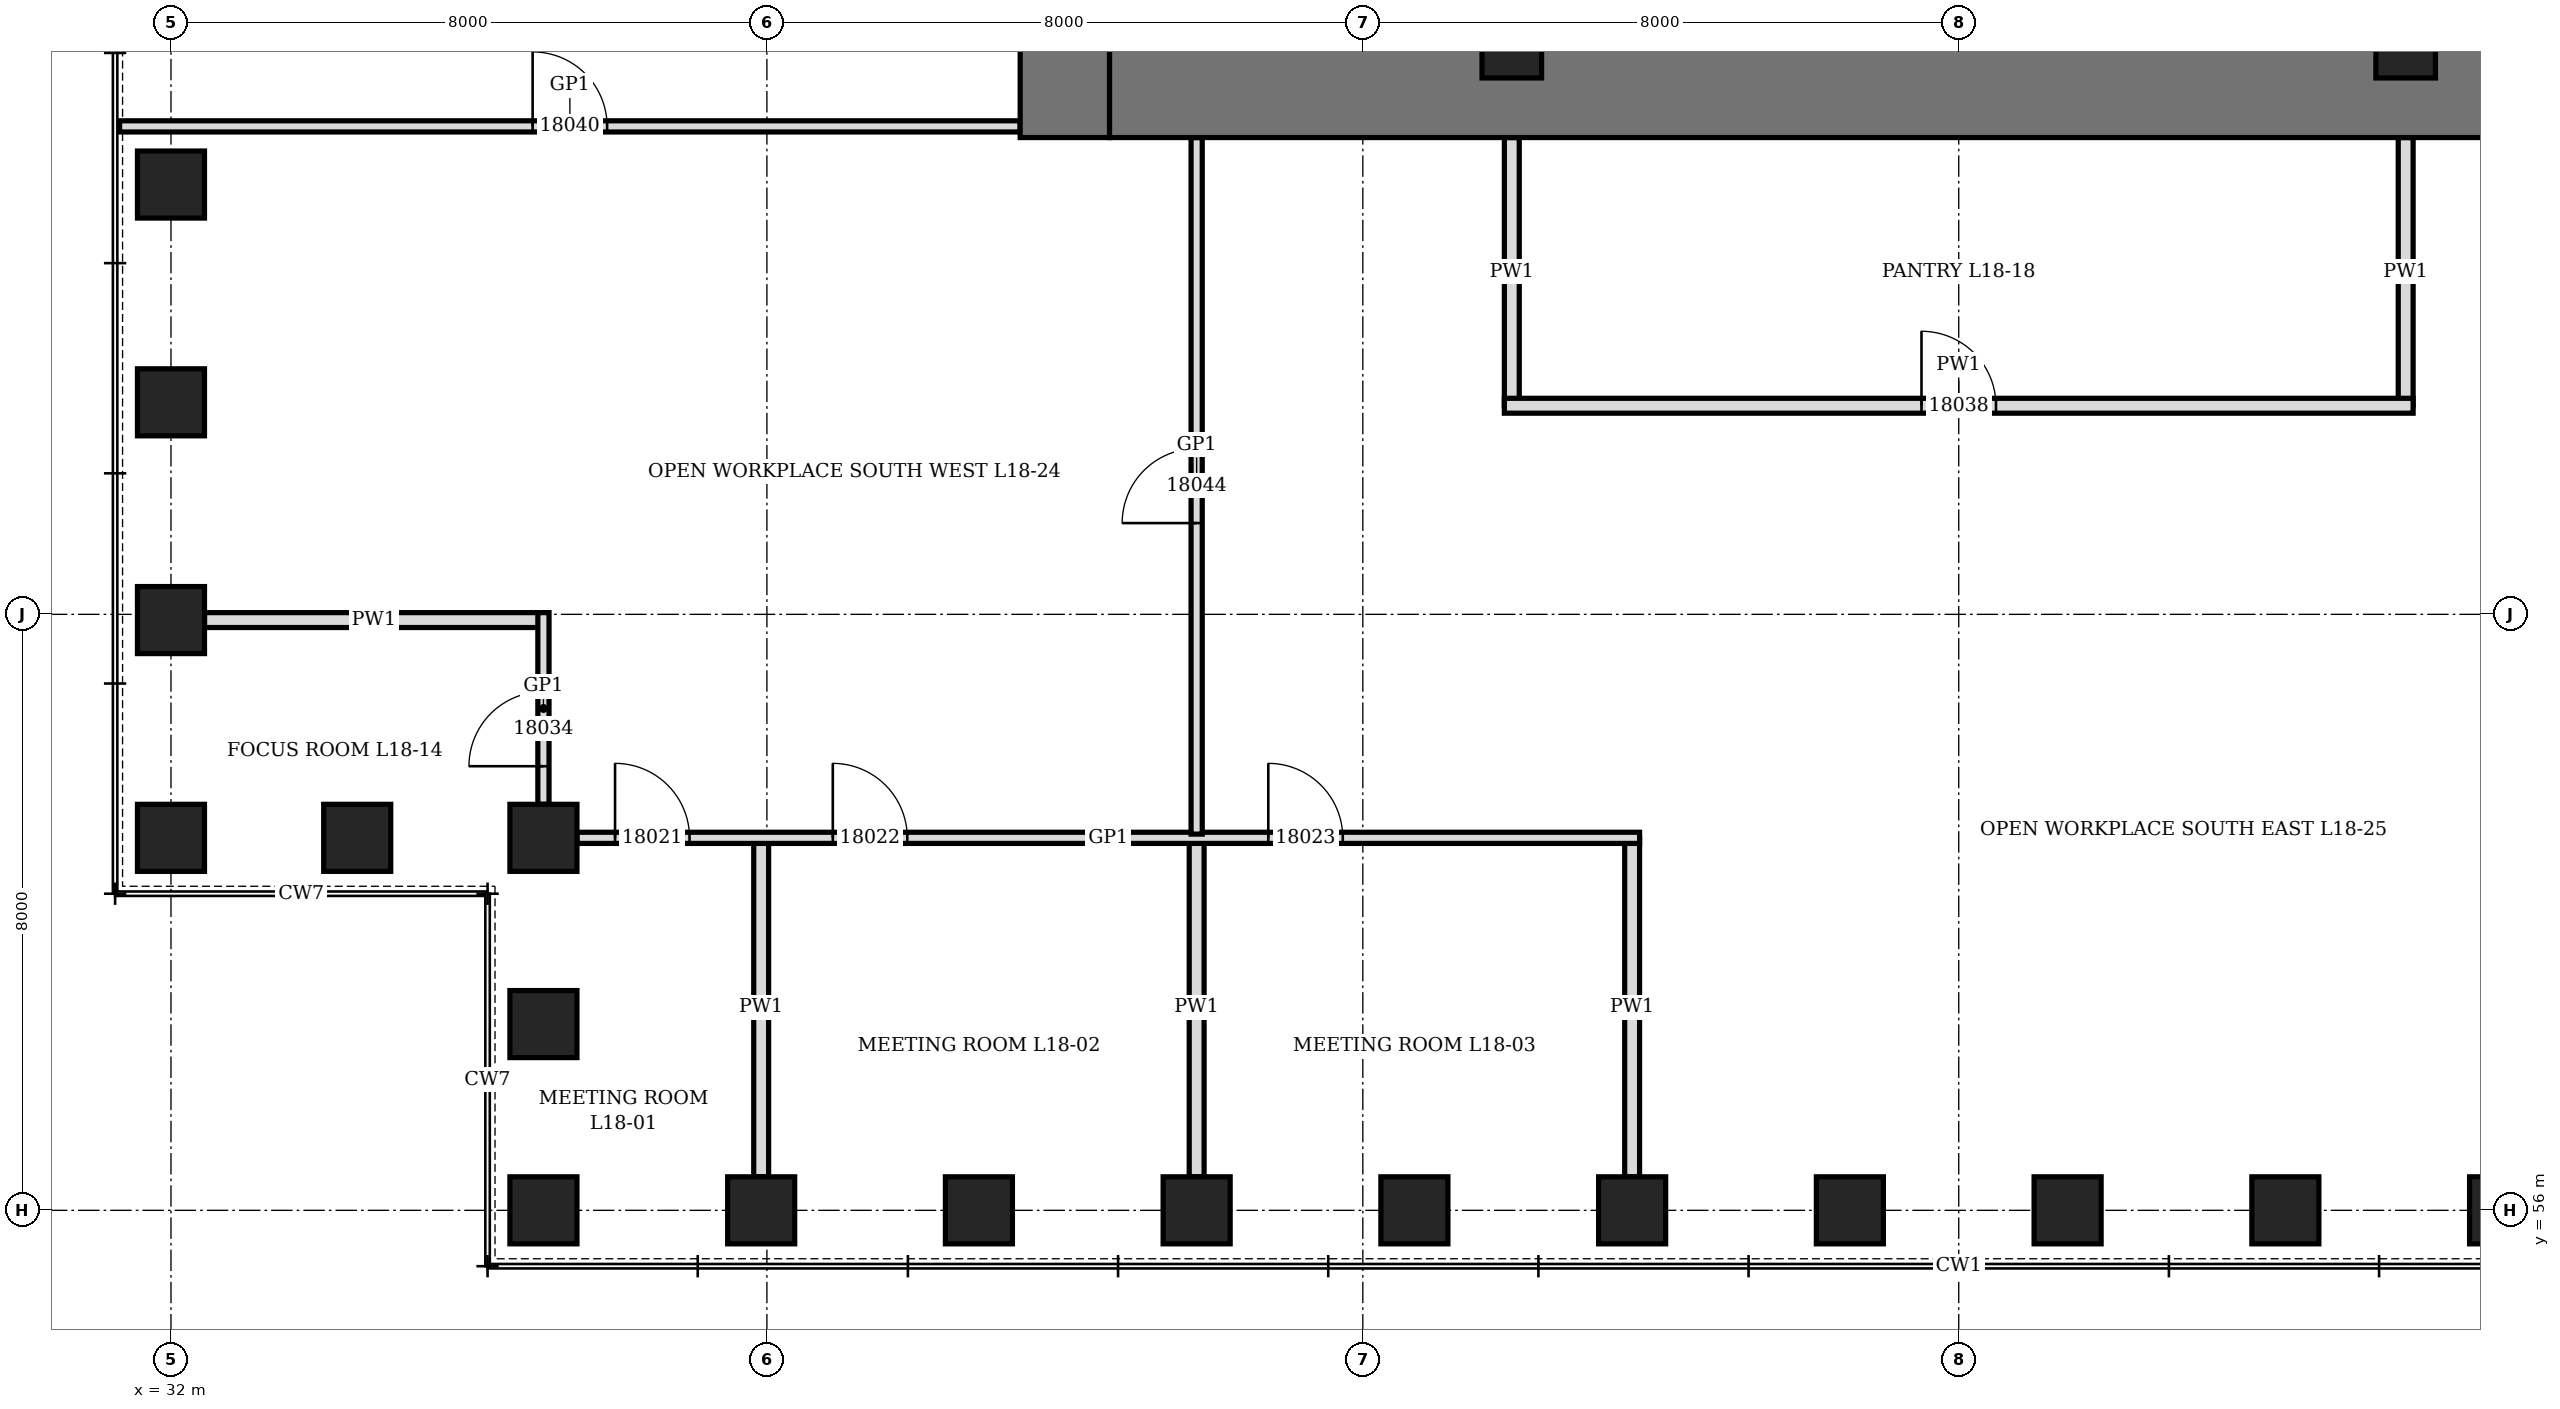
"""IFC4 building model, lengths in metres.
Left out: names, types, materials, properties, quantities, classifications, styles, units other than length and angle.
Written with IfcOpenShell. Run it as: python <this file> out.ifc"""

import sys

from ifc_helpers import new_model, si_unit, direction, frame, frame_2d, origin, origin_2d, place, context, subcontext, project, spatial, rectangle, hollow_rectangle, extrude, element, fill, save


model = new_model("IFC4")
c1 = context("Model", 3, precision=1e-05, world=origin(), true_north=direction((0.0, 1.0)))
c2 = subcontext(c1, "Body", "Model", "MODEL_VIEW")
j1 = project(units=[si_unit("LENGTHUNIT", "METRE"), si_unit("PLANEANGLEUNIT", "RADIAN")], contexts=[c1])
p1 = place(None, origin())
s1 = spatial("IfcSite", under=j1, at=p1, CompositionType="ELEMENT")
p2 = place(p1, origin())
s2 = spatial("IfcBuilding", under=s1, at=p2, CompositionType="ELEMENT")
p3 = place(p2, frame((0.0, 0.0, 85.3)))
s3 = spatial("IfcBuildingStorey", under=s2, at=p3, CompositionType="ELEMENT", Elevation=85.3)
for number, where, z_axis, x_axis in (
    (1, (37.0, 56.0, 0.0), (0.0, 0.0, 1.0), (1.0, 0.0, 0.0)),
    (2, (39.923, 56.0, 0.0), (0.0, 0.0, 1.0), (1.0, 0.0, 0.0)),
    (3, (42.846, 56.0, 0.0), (0.0, 0.0, 1.0), (1.0, 0.0, 0.0)),
    (4, (45.769, 56.0, 0.0), (0.0, 0.0, 1.0), (1.0, 0.0, 0.0)),
    (5, (48.692, 56.0, 0.0), (0.0, 0.0, 1.0), (1.0, 0.0, 0.0)),
    (6, (51.615, 56.0, 0.0), (0.0, 0.0, 1.0), (1.0, 0.0, 0.0)),
    (7, (54.539, 56.0, 0.0), (0.0, 0.0, 1.0), (1.0, 0.0, 0.0)),
    (8, (57.461, 56.0, 0.0), (0.0, 0.0, 1.0), (1.0, 0.0, 0.0)),
    (9, (60.385, 56.0, 0.0), (0.0, 0.0, 1.0), (1.0, 0.0, 0.0)),
    (10, (63.308, 56.0, 0.0), (0.0, 0.0, 1.0), (1.0, 0.0, 0.0)),
    (11, (32.0, 69.769, 0.0), (0.0, 0.0, 1.0), (0.0, 1.0, 0.0)),
    (12, (32.0, 66.846, 0.0), (0.0, 0.0, 1.0), (0.0, 1.0, 0.0)),
    (13, (32.0, 63.923, 0.0), (0.0, 0.0, 1.0), (0.0, 1.0, 0.0)),
    (14, (32.0, 61.0, 0.0), (0.0, 0.0, 1.0), (1.0, 0.0, 0.0)),
    (15, (34.5, 61.0, 0.0), (0.0, 0.0, 1.0), (1.0, 0.0, 0.0)),
    (16, (37.0, 61.0, 0.0), (0.0, 0.0, 1.0), (0.0, 1.0, 0.0)),
    (17, (37.0, 58.5, 0.0), (0.0, 0.0, 1.0), (0.0, 1.0, 0.0)),
):
    element("IfcColumn", number, at=place(p3, frame(where, z_axis=z_axis, x_axis=x_axis)), inside=s3, PredefinedType="COLUMN", context=c2, shape_type="SweptSolid", body=[
        extrude(hollow_rectangle(XDim=0.9, YDim=0.9, WallThickness=0.12, at=origin_2d()), origin(), (0.0, 0.0, 1.0), 4.2),
    ])
p4 = place(p3, frame((44.0, 70.4, 0.0), z_axis=(0.0, 0.0, 1.0), x_axis=(0.0, 1.0, 0.0)))
e18 = element("IfcWall", 18, at=p4, inside=s3, PredefinedType="SHEAR", context=c2, shape_type="SweptSolid", body=[
    extrude(rectangle(XDim=19.2, YDim=1.2, at=frame_2d((9.6, 0.0))), origin(), (0.0, 0.0, 1.0), 4.2),
])
p5 = place(p4, frame((8.6, 0.0, 0.0)))
e19 = element("IfcOpeningElement", 19, at=p5, cuts=e18, PredefinedType="OPENING", context=c2, shape_type="SweptSolid", body=[
    extrude(rectangle(XDim=2.0, YDim=2.4, at=frame_2d((1.0, 1.2))), frame((0.0, 0.61, 0.0), z_axis=(0.0, -1.0, 0.0), x_axis=(1.0, 0.0, 0.0)), (0.0, 0.0, 1.0), 1.22),
])
p6 = place(p3, frame((44.6, 71.0, 0.0), z_axis=(0.0, 0.0, 1.0), x_axis=(1.0, 0.0, 0.0)))
e20 = element("IfcWall", 20, at=p6, inside=s3, PredefinedType="SHEAR", context=c2, shape_type="SweptSolid", body=[
    extrude(rectangle(XDim=22.8, YDim=1.2, at=frame_2d((11.4, 0.0))), origin(), (0.0, 0.0, 1.0), 4.2),
])
for number, where, z_axis, x_axis in (
    (21, (50.0, 71.6, 0.0), (0.0, 0.0, 1.0), (1.0, 0.0, 0.0)),
    (22, (62.0, 71.6, 0.0), (0.0, 0.0, 1.0), (1.0, 0.0, 0.0)),
):
    element("IfcColumn", number, at=place(p3, frame(where, z_axis=z_axis, x_axis=x_axis)), inside=s3, PredefinedType="COLUMN", context=c2, shape_type="SweptSolid", body=[
        extrude(hollow_rectangle(XDim=0.8, YDim=0.8, WallThickness=0.1, at=origin_2d()), origin(), (0.0, 0.0, 1.0), 4.2),
    ])
p7 = place(p3, frame((39.923, 56.45, 0.0), z_axis=(0.0, 0.0, 1.0), x_axis=(0.0, 1.0, 0.0)))
e23 = element("IfcWall", 23, at=p7, inside=s3, PredefinedType="PARTITIONING", context=c2, shape_type="SweptSolid", body=[
    extrude(rectangle(XDim=4.55, YDim=0.2, at=frame_2d((2.275, 0.0))), origin(), (0.0, 0.0, 1.0), 3.428),
])
for number, where, z_axis, x_axis in (
    (24, (45.769, 56.45, 0.0), (0.0, 0.0, 1.0), (0.0, 1.0, 0.0)),
    (25, (51.615, 56.45, 0.0), (0.0, 0.0, 1.0), (0.0, 1.0, 0.0)),
):
    element("IfcWall", number, at=place(p3, frame(where, z_axis=z_axis, x_axis=x_axis)), inside=s3, PredefinedType="PARTITIONING", context=c2, shape_type="SweptSolid", body=[
        extrude(rectangle(XDim=4.55, YDim=0.2, at=frame_2d((2.275, 0.0))), origin(), (0.0, 0.0, 1.0), 3.278),
    ])
p8 = place(p3, frame((32.45, 63.923, 0.0), z_axis=(0.0, 0.0, 1.0), x_axis=(1.0, 0.0, 0.0)))
e26 = element("IfcWall", 26, at=p8, inside=s3, PredefinedType="PARTITIONING", context=c2, shape_type="SweptSolid", body=[
    extrude(rectangle(XDim=4.55, YDim=0.2, at=frame_2d((2.275, 0.0))), origin(), (0.0, 0.0, 1.0), 3.428),
])
for number, where, z_axis, x_axis in (
    (27, (50.0, 66.8, 0.0), (0.0, 0.0, 1.0), (0.0, 1.0, 0.0)),
    (28, (62.0, 66.8, 0.0), (0.0, 0.0, 1.0), (0.0, 1.0, 0.0)),
):
    element("IfcWall", number, at=place(p3, frame(where, z_axis=z_axis, x_axis=x_axis)), inside=s3, PredefinedType="PARTITIONING", context=c2, shape_type="SweptSolid", body=[
        extrude(rectangle(XDim=3.6, YDim=0.2, at=frame_2d((1.8, 0.0))), origin(), (0.0, 0.0, 1.0), 4.04),
    ])
p9 = place(p3, frame((37.45, 61.0, 0.0), z_axis=(0.0, 0.0, 1.0), x_axis=(1.0, 0.0, 0.0)))
e29 = element("IfcWall", 29, at=p9, inside=s3, PredefinedType="PARTITIONING", context=c2, shape_type="SweptSolid", body=[
    extrude(rectangle(XDim=14.265, YDim=0.15, at=frame_2d((7.133, 0.0))), origin(), (0.0, 0.0, 1.0), 4.04),
])
p10 = place(p9, frame((0.511, 0.0, 0.0)))
e30 = element("IfcOpeningElement", 30, at=p10, cuts=e29, PredefinedType="OPENING", context=c2, shape_type="SweptSolid", body=[
    extrude(rectangle(XDim=1.0, YDim=2.4, at=frame_2d((0.5, 1.2))), frame((0.0, 0.085, 0.0), z_axis=(0.0, -1.0, 0.0), x_axis=(1.0, 0.0, 0.0)), (0.0, 0.0, 1.0), 0.17),
])
p11 = place(p9, frame((3.435, 0.0, 0.0)))
e31 = element("IfcOpeningElement", 31, at=p11, cuts=e29, PredefinedType="OPENING", context=c2, shape_type="SweptSolid", body=[
    extrude(rectangle(XDim=1.0, YDim=2.4, at=frame_2d((0.5, 1.2))), frame((0.0, 0.085, 0.0), z_axis=(0.0, -1.0, 0.0), x_axis=(1.0, 0.0, 0.0)), (0.0, 0.0, 1.0), 0.17),
])
p12 = place(p9, frame((9.281, 0.0, 0.0)))
e32 = element("IfcOpeningElement", 32, at=p12, cuts=e29, PredefinedType="OPENING", context=c2, shape_type="SweptSolid", body=[
    extrude(rectangle(XDim=1.0, YDim=2.4, at=frame_2d((0.5, 1.2))), frame((0.0, 0.085, 0.0), z_axis=(0.0, -1.0, 0.0), x_axis=(1.0, 0.0, 0.0)), (0.0, 0.0, 1.0), 0.17),
])
p13 = place(p3, frame((49.9, 66.8, 0.0), z_axis=(0.0, 0.0, 1.0), x_axis=(1.0, 0.0, 0.0)))
e33 = element("IfcWall", 33, at=p13, inside=s3, PredefinedType="PARTITIONING", context=c2, shape_type="SweptSolid", body=[
    extrude(rectangle(XDim=12.2, YDim=0.2, at=frame_2d((6.1, 0.0))), origin(), (0.0, 0.0, 1.0), 4.04),
])
p14 = place(p13, frame((5.6, 0.0, 0.0)))
e34 = element("IfcOpeningElement", 34, at=p14, cuts=e33, PredefinedType="OPENING", context=c2, shape_type="SweptSolid", body=[
    extrude(rectangle(XDim=1.0, YDim=2.1, at=frame_2d((0.5, 1.05))), frame((0.0, 0.11, 0.0), z_axis=(0.0, -1.0, 0.0), x_axis=(1.0, 0.0, 0.0)), (0.0, 0.0, 1.0), 0.22),
])
p15 = place(p3, frame((31.31, 70.55, 0.0), z_axis=(0.0, 0.0, 1.0), x_axis=(1.0, 0.0, 0.0)))
e35 = element("IfcWall", 35, at=p15, inside=s3, PredefinedType="PARTITIONING", context=c2, shape_type="SweptSolid", body=[
    extrude(rectangle(XDim=12.09, YDim=0.15, at=frame_2d((6.045, 0.0))), origin(), (0.0, 0.0, 1.0), 4.04),
])
p16 = place(p15, frame((5.545, 0.0, 0.0)))
e36 = element("IfcOpeningElement", 36, at=p16, cuts=e35, PredefinedType="OPENING", context=c2, shape_type="SweptSolid", body=[
    extrude(rectangle(XDim=1.0, YDim=2.4, at=frame_2d((0.5, 1.2))), frame((0.0, 0.085, 0.0), z_axis=(0.0, -1.0, 0.0), x_axis=(1.0, 0.0, 0.0)), (0.0, 0.0, 1.0), 0.17),
])
p17 = place(p3, frame((37.0, 61.45, 0.0), z_axis=(0.0, 0.0, 1.0), x_axis=(0.0, 1.0, 0.0)))
e37 = element("IfcWall", 37, at=p17, inside=s3, PredefinedType="PARTITIONING", context=c2, shape_type="SweptSolid", body=[
    extrude(rectangle(XDim=2.573, YDim=0.15, at=frame_2d((1.287, 0.0))), origin(), (0.0, 0.0, 1.0), 4.04),
])
p18 = place(p17, frame((0.511, 0.0, 0.0)))
e38 = element("IfcOpeningElement", 38, at=p18, cuts=e37, PredefinedType="OPENING", context=c2, shape_type="SweptSolid", body=[
    extrude(rectangle(XDim=1.0, YDim=2.4, at=frame_2d((0.5, 1.2))), frame((0.0, 0.085, 0.0), z_axis=(0.0, -1.0, 0.0), x_axis=(1.0, 0.0, 0.0)), (0.0, 0.0, 1.0), 0.17),
])
p19 = place(p3, frame((45.769, 61.05, 0.0), z_axis=(0.0, 0.0, 1.0), x_axis=(0.0, 1.0, 0.0)))
e39 = element("IfcWall", 39, at=p19, inside=s3, PredefinedType="PARTITIONING", context=c2, shape_type="SweptSolid", body=[
    extrude(rectangle(XDim=9.35, YDim=0.15, at=frame_2d((4.675, 0.0))), origin(), (0.0, 0.0, 1.0), 3.278),
])
p20 = place(p19, frame((4.175, 0.0, 0.0)))
e40 = element("IfcOpeningElement", 40, at=p20, cuts=e39, PredefinedType="OPENING", context=c2, shape_type="SweptSolid", body=[
    extrude(rectangle(XDim=1.0, YDim=2.4, at=frame_2d((0.5, 1.2))), frame((0.0, 0.085, 0.0), z_axis=(0.0, -1.0, 0.0), x_axis=(1.0, 0.0, 0.0)), (0.0, 0.0, 1.0), 0.17),
])
p21 = place(p10, origin())
e41 = element("IfcDoor", 41, at=p21, inside=s3, OperationType="SINGLE_SWING_RIGHT", PredefinedType="DOOR", context=c2, shape_type="SweptSolid", body=[
    extrude(rectangle(XDim=1.0, YDim=2.4, at=frame_2d((0.5, 1.2))), frame((0.0, 0.075, 0.0), z_axis=(0.0, -1.0, 0.0), x_axis=(1.0, 0.0, 0.0)), (0.0, 0.0, 1.0), 0.149),
])
fill(e30, e41)
p22 = place(p11, origin())
e42 = element("IfcDoor", 42, at=p22, inside=s3, OperationType="SINGLE_SWING_RIGHT", PredefinedType="DOOR", context=c2, shape_type="SweptSolid", body=[
    extrude(rectangle(XDim=1.0, YDim=2.4, at=frame_2d((0.5, 1.2))), frame((0.0, 0.075, 0.0), z_axis=(0.0, -1.0, 0.0), x_axis=(1.0, 0.0, 0.0)), (0.0, 0.0, 1.0), 0.149),
])
fill(e31, e42)
p23 = place(p12, origin())
e43 = element("IfcDoor", 43, at=p23, inside=s3, OperationType="SINGLE_SWING_RIGHT", PredefinedType="DOOR", context=c2, shape_type="SweptSolid", body=[
    extrude(rectangle(XDim=1.0, YDim=2.4, at=frame_2d((0.5, 1.2))), frame((0.0, 0.075, 0.0), z_axis=(0.0, -1.0, 0.0), x_axis=(1.0, 0.0, 0.0)), (0.0, 0.0, 1.0), 0.149),
])
fill(e32, e43)
p24 = place(p18, origin())
e44 = element("IfcDoor", 44, at=p24, inside=s3, OperationType="SINGLE_SWING_RIGHT", PredefinedType="DOOR", context=c2, shape_type="SweptSolid", body=[
    extrude(rectangle(XDim=1.0, YDim=2.4, at=frame_2d((0.5, 1.2))), frame((0.0, 0.075, 0.0), z_axis=(0.0, -1.0, 0.0), x_axis=(1.0, 0.0, 0.0)), (0.0, 0.0, 1.0), 0.149),
])
fill(e38, e44)
p25 = place(p14, origin())
e45 = element("IfcDoor", 45, at=p25, inside=s3, OperationType="SINGLE_SWING_LEFT", PredefinedType="DOOR", context=c2, shape_type="SweptSolid", body=[
    extrude(rectangle(XDim=1.0, YDim=2.1, at=frame_2d((0.5, 1.05))), frame((0.0, 0.1, 0.0), z_axis=(0.0, -1.0, 0.0), x_axis=(1.0, 0.0, 0.0)), (0.0, 0.0, 1.0), 0.199),
])
fill(e34, e45)
p26 = place(p16, origin())
e46 = element("IfcDoor", 46, at=p26, inside=s3, OperationType="SINGLE_SWING_RIGHT", PredefinedType="DOOR", context=c2, shape_type="SweptSolid", body=[
    extrude(rectangle(XDim=1.0, YDim=2.4, at=frame_2d((0.5, 1.2))), frame((0.0, 0.075, 0.0), z_axis=(0.0, -1.0, 0.0), x_axis=(1.0, 0.0, 0.0)), (0.0, 0.0, 1.0), 0.149),
])
fill(e36, e46)
p27 = place(p20, origin())
e47 = element("IfcDoor", 47, at=p27, inside=s3, OperationType="SINGLE_SWING_RIGHT", PredefinedType="DOOR", context=c2, shape_type="SweptSolid", body=[
    extrude(rectangle(XDim=1.0, YDim=2.4, at=frame_2d((0.5, 1.2))), frame((0.0, 0.075, 0.0), z_axis=(0.0, -1.0, 0.0), x_axis=(1.0, 0.0, 0.0)), (0.0, 0.0, 1.0), 0.149),
])
fill(e40, e47)
save(model, sys.argv[1])
